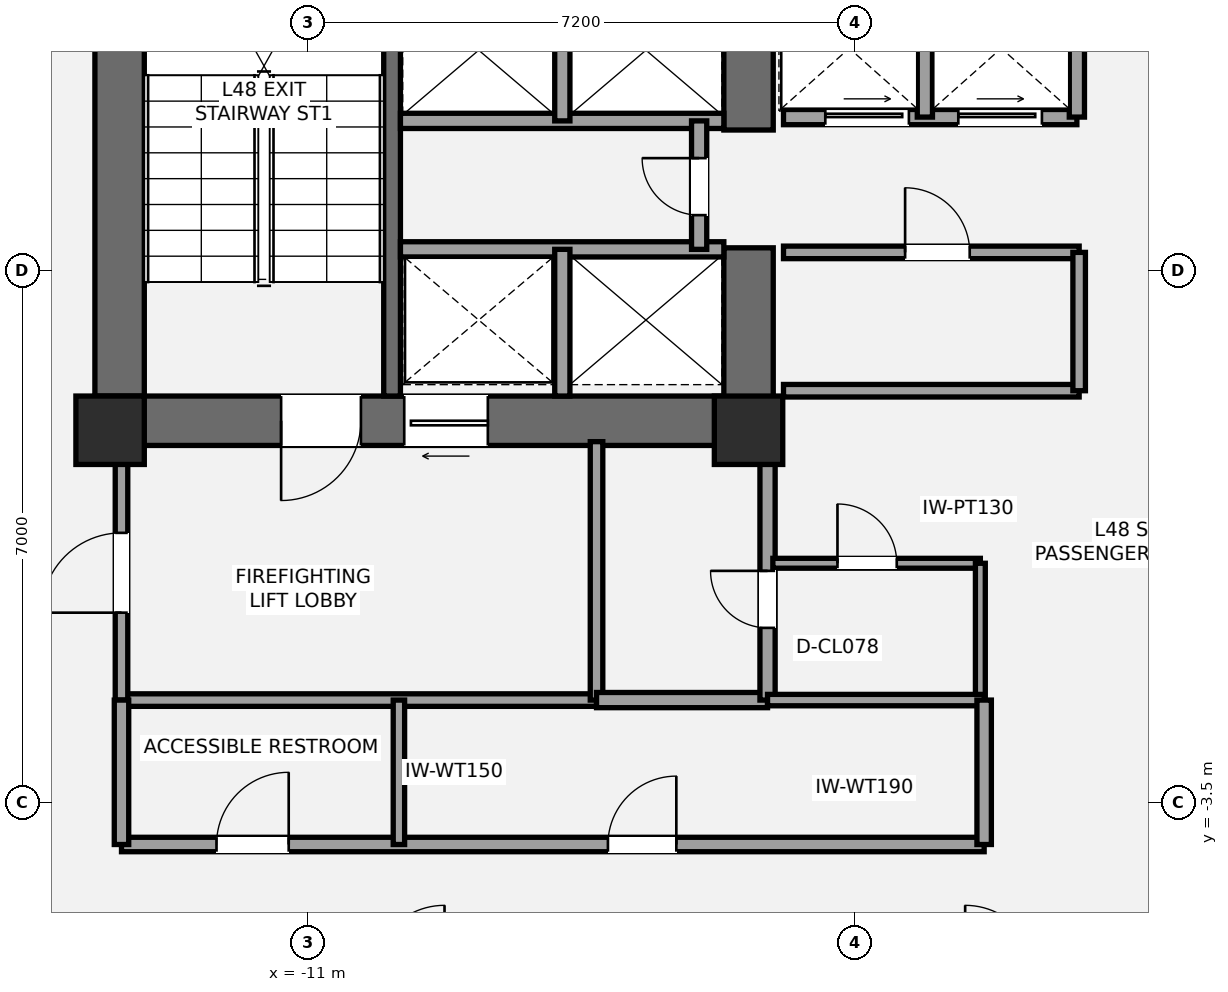
"""IFC4 building model, lengths in metres.
Left out: names, types, materials, properties, quantities, classifications, styles, units other than length and angle.
Written with IfcOpenShell. Run it as: python <this file> out.ifc"""

import sys

from ifc_helpers import new_model, si_unit, direction, frame, frame_2d, origin, origin_2d, place, context, subcontext, project, spatial, rectangle, extrude, element, fill, save


model = new_model("IFC4")
c1 = context("Model", 3, precision=1e-05, world=origin(), true_north=direction((0.0, 1.0)))
c2 = subcontext(c1, "Body", "Model", "MODEL_VIEW")
j1 = project(units=[si_unit("LENGTHUNIT", "METRE"), si_unit("PLANEANGLEUNIT", "RADIAN")], contexts=[c1])
p1 = place(None, origin())
s1 = spatial("IfcSite", under=j1, at=p1, CompositionType="ELEMENT")
p2 = place(p1, origin())
s2 = spatial("IfcBuilding", under=s1, at=p2, CompositionType="ELEMENT")
p3 = place(p2, frame((0.0, 0.0, 175.8)))
s3 = spatial("IfcBuildingStorey", under=s2, at=p3, CompositionType="ELEMENT", Elevation=175.8)
p4 = place(p3, frame((-13.475, 1.2, 0.0), z_axis=(0.0, 0.0, 1.0), x_axis=(0.0, 1.0, 0.0)))
e1 = element("IfcWall", 1, at=p4, inside=s3, PredefinedType="SHEAR", context=c2, shape_type="SweptSolid", body=[
    extrude(rectangle(XDim=8.45, YDim=0.65, at=frame_2d((4.225, 0.0))), origin(), (0.0, 0.0, 1.0), 3.2),
])
p5 = place(p3, frame((-4.875, 1.525, 0.0), z_axis=(0.0, 0.0, 1.0), x_axis=(-1.0, 0.0, 0.0)))
e2 = element("IfcWall", 2, at=p5, inside=s3, PredefinedType="SHEAR", context=c2, shape_type="SweptSolid", body=[
    extrude(rectangle(XDim=8.925, YDim=0.65, at=frame_2d((4.462, 0.0))), origin(), (0.0, 0.0, 1.0), 3.2),
])
p6 = place(p5, frame((5.425, 0.0, 0.0)))
e3 = element("IfcOpeningElement", 3, at=p6, cuts=e2, PredefinedType="OPENING", context=c2, shape_type="SweptSolid", body=[
    extrude(rectangle(XDim=1.05, YDim=2.15, at=frame_2d((0.525, 1.075))), frame((0.0, 0.335, 0.0), z_axis=(0.0, -1.0, 0.0), x_axis=(1.0, 0.0, 0.0)), (0.0, 0.0, 1.0), 0.67),
])
p7 = place(p5, frame((3.755, 0.0, 0.0)))
e4 = element("IfcOpeningElement", 4, at=p7, cuts=e2, PredefinedType="OPENING", context=c2, shape_type="SweptSolid", body=[
    extrude(rectangle(XDim=1.1, YDim=2.2, at=frame_2d((0.55, 1.1))), frame((0.0, 0.335, 0.0), z_axis=(0.0, -1.0, 0.0), x_axis=(1.0, 0.0, 0.0)), (0.0, 0.0, 1.0), 0.67),
])
p8 = place(p3, frame((-5.2, 1.2, 0.0), z_axis=(0.0, 0.0, 1.0), x_axis=(0.0, 1.0, 0.0)))
e5 = element("IfcWall", 5, at=p8, inside=s3, PredefinedType="SHEAR", context=c2, shape_type="SweptSolid", body=[
    extrude(rectangle(XDim=2.6, YDim=0.65, at=frame_2d((1.3, 0.0))), origin(), (0.0, 0.0, 1.0), 3.2),
])
p9 = place(p3, frame((-5.2, 5.35, 0.0), z_axis=(0.0, 0.0, 1.0), x_axis=(0.0, 1.0, 0.0)))
e6 = element("IfcWall", 6, at=p9, inside=s3, PredefinedType="SHEAR", context=c2, shape_type="SweptSolid", body=[
    extrude(rectangle(XDim=2.0, YDim=0.65, at=frame_2d((1.0, 0.0))), origin(), (0.0, 0.0, 1.0), 3.2),
])
p10 = place(p3, frame((-9.89, 1.85, 0.0), z_axis=(0.0, 0.0, 1.0), x_axis=(0.0, 1.0, 0.0)))
e7 = element("IfcWall", 7, at=p10, inside=s3, PredefinedType="SHEAR", context=c2, shape_type="SweptSolid", body=[
    extrude(rectangle(XDim=7.15, YDim=0.22, at=frame_2d((3.575, 0.0))), origin(), (0.0, 0.0, 1.0), 3.2),
])
for number, where, z_axis, x_axis in (
    (8, (-13.6, 1.4, 0.0), (0.0, 0.0, 1.0), (1.0, 0.0, 0.0)),
    (9, (-5.2, 1.4, 0.0), (0.0, 0.0, 1.0), (1.0, 0.0, 0.0)),
):
    element("IfcColumn", number, at=place(p3, frame(where, z_axis=z_axis, x_axis=x_axis)), inside=s3, PredefinedType="COLUMN", context=c2, shape_type="SweptSolid", body=[
        extrude(rectangle(XDim=0.9, YDim=0.9, at=origin_2d()), origin(), (0.0, 0.0, 1.0), 3.2),
    ])
p11 = place(p3, frame((-13.45, -2.15, 0.0), z_axis=(0.0, 0.0, 1.0), x_axis=(1.0, 0.0, 0.0)))
e10 = element("IfcWall", 10, at=p11, inside=s3, PredefinedType="PARTITIONING", context=c2, shape_type="SweptSolid", body=[
    extrude(rectangle(XDim=6.25, YDim=0.165, at=frame_2d((3.125, 0.0))), origin(), (0.0, 0.0, 1.0), 2.473),
])
p12 = place(p3, frame((-13.45, -2.15, 0.0), z_axis=(0.0, 0.0, 1.0), x_axis=(0.0, 1.0, 0.0)))
e11 = element("IfcWall", 11, at=p12, inside=s3, PredefinedType="PARTITIONING", context=c2, shape_type="SweptSolid", body=[
    extrude(rectangle(XDim=3.4, YDim=0.165, at=frame_2d((1.7, 0.0))), origin(), (0.0, 0.0, 1.0), 2.473),
])
p13 = place(p12, frame((1.15, 0.0, 0.0)))
e12 = element("IfcOpeningElement", 12, at=p13, cuts=e11, PredefinedType="OPENING", context=c2, shape_type="SweptSolid", body=[
    extrude(rectangle(XDim=1.05, YDim=2.15, at=frame_2d((0.525, 1.075))), frame((0.0, 0.093, 0.0), z_axis=(0.0, -1.0, 0.0), x_axis=(1.0, 0.0, 0.0)), (0.0, 0.0, 1.0), 0.185),
])
p14 = place(p3, frame((-7.2, -2.15, 0.0), z_axis=(0.0, 0.0, 1.0), x_axis=(0.0, 1.0, 0.0)))
e13 = element("IfcWall", 13, at=p14, inside=s3, PredefinedType="PARTITIONING", context=c2, shape_type="SweptSolid", body=[
    extrude(rectangle(XDim=3.4, YDim=0.165, at=frame_2d((1.7, 0.0))), origin(), (0.0, 0.0, 1.0), 2.473),
])
p15 = place(p3, frame((-7.2, -2.15, 0.0), z_axis=(0.0, 0.0, 1.0), x_axis=(1.0, 0.0, 0.0)))
e14 = element("IfcWall", 14, at=p15, inside=s3, PredefinedType="SOLIDWALL", context=c2, shape_type="SweptSolid", body=[
    extrude(rectangle(XDim=2.25, YDim=0.2, at=frame_2d((1.125, 0.0))), origin(), (0.0, 0.0, 1.0), 3.02),
])
p16 = place(p3, frame((-4.95, -2.15, 0.0), z_axis=(0.0, 0.0, 1.0), x_axis=(0.0, 1.0, 0.0)))
e15 = element("IfcWall", 15, at=p16, inside=s3, PredefinedType="SOLIDWALL", context=c2, shape_type="SweptSolid", body=[
    extrude(rectangle(XDim=3.4, YDim=0.2, at=frame_2d((1.7, 0.0))), origin(), (0.0, 0.0, 1.0), 2.473),
])
p17 = place(p16, frame((0.95, 0.0, 0.0)))
e16 = element("IfcOpeningElement", 16, at=p17, cuts=e15, PredefinedType="OPENING", context=c2, shape_type="SweptSolid", body=[
    extrude(rectangle(XDim=0.75, YDim=2.1, at=frame_2d((0.375, 1.05))), frame((0.0, 0.11, 0.0), z_axis=(0.0, -1.0, 0.0), x_axis=(1.0, 0.0, 0.0)), (0.0, 0.0, 1.0), 0.22),
])
p18 = place(p3, frame((-4.88, -0.35, 0.0), z_axis=(0.0, 0.0, 1.0), x_axis=(1.0, 0.0, 0.0)))
e17 = element("IfcWall", 17, at=p18, inside=s3, PredefinedType="PARTITIONING", context=c2, shape_type="SweptSolid", body=[
    extrude(rectangle(XDim=2.73, YDim=0.13, at=frame_2d((1.365, 0.0))), origin(), (0.0, 0.0, 1.0), 3.02),
])
p19 = place(p18, frame((0.85, 0.0, 0.0)))
e18 = element("IfcOpeningElement", 18, at=p19, cuts=e17, PredefinedType="OPENING", context=c2, shape_type="SweptSolid", body=[
    extrude(rectangle(XDim=0.78, YDim=2.1, at=frame_2d((0.39, 1.05))), frame((0.0, 0.075, 0.0), z_axis=(0.0, -1.0, 0.0), x_axis=(1.0, 0.0, 0.0)), (0.0, 0.0, 1.0), 0.15),
])
p20 = place(p3, frame((-2.15, -2.15, 0.0), z_axis=(0.0, 0.0, 1.0), x_axis=(0.0, 1.0, 0.0)))
e19 = element("IfcWall", 19, at=p20, inside=s3, PredefinedType="PARTITIONING", context=c2, shape_type="SweptSolid", body=[
    extrude(rectangle(XDim=1.8, YDim=0.13, at=frame_2d((0.9, 0.0))), origin(), (0.0, 0.0, 1.0), 3.02),
])
p21 = place(p3, frame((-9.78, 3.78, 0.0), z_axis=(0.0, 0.0, 1.0), x_axis=(1.0, 0.0, 0.0)))
e20 = element("IfcWall", 20, at=p21, inside=s3, PredefinedType="SOLIDWALL", context=c2, shape_type="SweptSolid", body=[
    extrude(rectangle(XDim=4.255, YDim=0.2, at=frame_2d((2.127, 0.0))), origin(), (0.0, 0.0, 1.0), 3.02),
])
p22 = place(p3, frame((-7.65, 1.85, 0.0), z_axis=(0.0, 0.0, 1.0), x_axis=(0.0, 1.0, 0.0)))
e21 = element("IfcWall", 21, at=p22, inside=s3, PredefinedType="SOLIDWALL", context=c2, shape_type="SweptSolid", body=[
    extrude(rectangle(XDim=1.93, YDim=0.2, at=frame_2d((0.965, 0.0))), origin(), (0.0, 0.0, 1.0), 3.02),
])
p23 = place(p3, frame((-9.78, 5.47, 0.0), z_axis=(0.0, 0.0, 1.0), x_axis=(1.0, 0.0, 0.0)))
e22 = element("IfcWall", 22, at=p23, inside=s3, PredefinedType="SOLIDWALL", context=c2, shape_type="SweptSolid", body=[
    extrude(rectangle(XDim=4.255, YDim=0.2, at=frame_2d((2.127, 0.0))), origin(), (0.0, 0.0, 1.0), 3.02),
])
p24 = place(p3, frame((-7.65, 5.47, 0.0), z_axis=(0.0, 0.0, 1.0), x_axis=(0.0, 1.0, 0.0)))
e23 = element("IfcWall", 23, at=p24, inside=s3, PredefinedType="SOLIDWALL", context=c2, shape_type="SweptSolid", body=[
    extrude(rectangle(XDim=1.86, YDim=0.2, at=frame_2d((0.93, 0.0))), origin(), (0.0, 0.0, 1.0), 3.02),
])
p25 = place(p3, frame((-5.85, 3.78, 0.0), z_axis=(0.0, 0.0, 1.0), x_axis=(0.0, 1.0, 0.0)))
e24 = element("IfcWall", 24, at=p25, inside=s3, PredefinedType="SOLIDWALL", context=c2, shape_type="SweptSolid", body=[
    extrude(rectangle(XDim=1.69, YDim=0.2, at=frame_2d((0.845, 0.0))), origin(), (0.0, 0.0, 1.0), 3.02),
])
p26 = place(p25, frame((0.45, 0.0, 0.0)))
e25 = element("IfcOpeningElement", 25, at=p26, cuts=e24, PredefinedType="OPENING", context=c2, shape_type="SweptSolid", body=[
    extrude(rectangle(XDim=0.75, YDim=2.1, at=frame_2d((0.375, 1.05))), frame((0.0, 0.11, 0.0), z_axis=(0.0, -1.0, 0.0), x_axis=(1.0, 0.0, 0.0)), (0.0, 0.0, 1.0), 0.22),
])
p27 = place(p3, frame((-4.74, 1.92, 0.0), z_axis=(0.0, 0.0, 1.0), x_axis=(1.0, 0.0, 0.0)))
e26 = element("IfcWall", 26, at=p27, inside=s3, PredefinedType="PARTITIONING", context=c2, shape_type="SweptSolid", body=[
    extrude(rectangle(XDim=3.89, YDim=0.165, at=frame_2d((1.945, 0.0))), origin(), (0.0, 0.0, 1.0), 2.16),
])
p28 = place(p3, frame((-4.74, 3.74, 0.0), z_axis=(0.0, 0.0, 1.0), x_axis=(1.0, 0.0, 0.0)))
e27 = element("IfcWall", 27, at=p28, inside=s3, PredefinedType="PARTITIONING", context=c2, shape_type="SweptSolid", body=[
    extrude(rectangle(XDim=3.89, YDim=0.165, at=frame_2d((1.945, 0.0))), origin(), (0.0, 0.0, 1.0), 3.02),
])
p29 = place(p28, frame((1.6, 0.0, 0.0)))
e28 = element("IfcOpeningElement", 28, at=p29, cuts=e27, PredefinedType="OPENING", context=c2, shape_type="SweptSolid", body=[
    extrude(rectangle(XDim=0.85, YDim=2.1, at=frame_2d((0.425, 1.05))), frame((0.0, 0.093, 0.0), z_axis=(0.0, -1.0, 0.0), x_axis=(1.0, 0.0, 0.0)), (0.0, 0.0, 1.0), 0.185),
])
p30 = place(p3, frame((-0.85, 1.92, 0.0), z_axis=(0.0, 0.0, 1.0), x_axis=(0.0, 1.0, 0.0)))
e29 = element("IfcWall", 29, at=p30, inside=s3, PredefinedType="PARTITIONING", context=c2, shape_type="SweptSolid", body=[
    extrude(rectangle(XDim=1.82, YDim=0.165, at=frame_2d((0.91, 0.0))), origin(), (0.0, 0.0, 1.0), 3.02),
])
p31 = place(p3, frame((-4.74, 5.52, 0.0), z_axis=(0.0, 0.0, 1.0), x_axis=(1.0, 0.0, 0.0)))
e30 = element("IfcWall", 30, at=p31, inside=s3, PredefinedType="SOLIDWALL", context=c2, shape_type="SweptSolid", body=[
    extrude(rectangle(XDim=3.86, YDim=0.2, at=frame_2d((1.93, 0.0))), origin(), (0.0, 0.0, 1.0), 3.02),
])
p32 = place(p31, frame((0.55, 0.0, 0.0)))
e31 = element("IfcOpeningElement", 31, at=p32, cuts=e30, PredefinedType="OPENING", context=c2, shape_type="SweptSolid", body=[
    extrude(rectangle(XDim=1.1, YDim=2.2, at=frame_2d((0.55, 1.1))), frame((0.0, 0.11, 0.0), z_axis=(0.0, -1.0, 0.0), x_axis=(1.0, 0.0, 0.0)), (0.0, 0.0, 1.0), 0.22),
])
p33 = place(p31, frame((2.3, 0.0, 0.0)))
e32 = element("IfcOpeningElement", 32, at=p33, cuts=e30, PredefinedType="OPENING", context=c2, shape_type="SweptSolid", body=[
    extrude(rectangle(XDim=1.1, YDim=2.2, at=frame_2d((0.55, 1.1))), frame((0.0, 0.11, 0.0), z_axis=(0.0, -1.0, 0.0), x_axis=(1.0, 0.0, 0.0)), (0.0, 0.0, 1.0), 0.22),
])
for number, where, z_axis, x_axis in (
    (33, (-2.88, 5.52, 0.0), (0.0, 0.0, 1.0), (0.0, 1.0, 0.0)),
    (34, (-0.88, 5.52, 0.0), (0.0, 0.0, 1.0), (0.0, 1.0, 0.0)),
):
    element("IfcWall", number, at=place(p3, frame(where, z_axis=z_axis, x_axis=x_axis)), inside=s3, PredefinedType="SOLIDWALL", context=c2, shape_type="SweptSolid", body=[
        extrude(rectangle(XDim=1.81, YDim=0.2, at=frame_2d((0.905, 0.0))), origin(), (0.0, 0.0, 1.0), 3.02),
    ])
p34 = place(p3, frame((-13.45, -4.05, 0.0), z_axis=(0.0, 0.0, 1.0), x_axis=(1.0, 0.0, 0.0)))
e35 = element("IfcWall", 35, at=p34, inside=s3, PredefinedType="PLUMBINGWALL", context=c2, shape_type="SweptSolid", body=[
    extrude(rectangle(XDim=11.35, YDim=0.19, at=frame_2d((5.675, 0.0))), origin(), (0.0, 0.0, 1.0), 2.473),
])
p35 = place(p34, frame((1.25, 0.0, 0.0)))
e36 = element("IfcOpeningElement", 36, at=p35, cuts=e35, PredefinedType="OPENING", context=c2, shape_type="SweptSolid", body=[
    extrude(rectangle(XDim=0.95, YDim=2.15, at=frame_2d((0.475, 1.075))), frame((0.0, 0.105, 0.0), z_axis=(0.0, -1.0, 0.0), x_axis=(1.0, 0.0, 0.0)), (0.0, 0.0, 1.0), 0.21),
])
p36 = place(p34, frame((6.4, 0.0, 0.0)))
e37 = element("IfcOpeningElement", 37, at=p36, cuts=e35, PredefinedType="OPENING", context=c2, shape_type="SweptSolid", body=[
    extrude(rectangle(XDim=0.9, YDim=2.1, at=frame_2d((0.45, 1.05))), frame((0.0, 0.105, 0.0), z_axis=(0.0, -1.0, 0.0), x_axis=(1.0, 0.0, 0.0)), (0.0, 0.0, 1.0), 0.21),
])
p37 = place(p3, frame((-4.95, -2.15, 0.0), z_axis=(0.0, 0.0, 1.0), x_axis=(1.0, 0.0, 0.0)))
e38 = element("IfcWall", 38, at=p37, inside=s3, PredefinedType="PLUMBINGWALL", context=c2, shape_type="SweptSolid", body=[
    extrude(rectangle(XDim=2.85, YDim=0.15, at=frame_2d((1.425, 0.0))), origin(), (0.0, 0.0, 1.0), 3.02),
])
p38 = place(p3, frame((-13.45, -4.05, 0.0), z_axis=(0.0, 0.0, 1.0), x_axis=(0.0, 1.0, 0.0)))
e39 = element("IfcWall", 39, at=p38, inside=s3, PredefinedType="PLUMBINGWALL", context=c2, shape_type="SweptSolid", body=[
    extrude(rectangle(XDim=1.9, YDim=0.19, at=frame_2d((0.95, 0.0))), origin(), (0.0, 0.0, 1.0), 2.473),
])
p39 = place(p3, frame((-2.1, -4.05, 0.0), z_axis=(0.0, 0.0, 1.0), x_axis=(0.0, 1.0, 0.0)))
e40 = element("IfcWall", 40, at=p39, inside=s3, PredefinedType="PLUMBINGWALL", context=c2, shape_type="SweptSolid", body=[
    extrude(rectangle(XDim=1.9, YDim=0.19, at=frame_2d((0.95, 0.0))), origin(), (0.0, 0.0, 1.0), 3.02),
])
p40 = place(p3, frame((-9.8, -4.05, 0.0), z_axis=(0.0, 0.0, 1.0), x_axis=(0.0, 1.0, 0.0)))
e41 = element("IfcWall", 41, at=p40, inside=s3, PredefinedType="PLUMBINGWALL", context=c2, shape_type="SweptSolid", body=[
    extrude(rectangle(XDim=1.9, YDim=0.15, at=frame_2d((0.95, 0.0))), origin(), (0.0, 0.0, 1.0), 2.473),
])
p41 = place(p6, origin())
e42 = element("IfcDoor", 42, at=p41, inside=s3, OperationType="SINGLE_SWING_RIGHT", PredefinedType="DOOR", context=c2, shape_type="SweptSolid", body=[
    extrude(rectangle(XDim=1.05, YDim=2.15, at=frame_2d((0.525, 1.075))), frame((0.0, 0.025, 0.0), z_axis=(0.0, -1.0, 0.0), x_axis=(1.0, 0.0, 0.0)), (0.0, 0.0, 1.0), 0.05),
])
fill(e3, e42)
p42 = place(p13, origin())
e43 = element("IfcDoor", 43, at=p42, inside=s3, OperationType="SINGLE_SWING_LEFT", PredefinedType="DOOR", context=c2, shape_type="SweptSolid", body=[
    extrude(rectangle(XDim=1.05, YDim=2.15, at=frame_2d((0.525, 1.075))), frame((0.0, 0.025, 0.0), z_axis=(0.0, -1.0, 0.0), x_axis=(1.0, 0.0, 0.0)), (0.0, 0.0, 1.0), 0.05),
])
fill(e12, e43)
p43 = place(p17, origin())
e44 = element("IfcDoor", 44, at=p43, inside=s3, OperationType="SINGLE_SWING_RIGHT", PredefinedType="DOOR", context=c2, shape_type="SweptSolid", body=[
    extrude(rectangle(XDim=0.75, YDim=2.1, at=frame_2d((0.375, 1.05))), frame((0.0, 0.025, 0.0), z_axis=(0.0, -1.0, 0.0), x_axis=(1.0, 0.0, 0.0)), (0.0, 0.0, 1.0), 0.05),
])
fill(e16, e44)
p44 = place(p19, origin())
e45 = element("IfcDoor", 45, at=p44, inside=s3, OperationType="SINGLE_SWING_LEFT", PredefinedType="DOOR", context=c2, shape_type="SweptSolid", body=[
    extrude(rectangle(XDim=0.78, YDim=2.1, at=frame_2d((0.39, 1.05))), frame((0.0, 0.025, 0.0), z_axis=(0.0, -1.0, 0.0), x_axis=(1.0, 0.0, 0.0)), (0.0, 0.0, 1.0), 0.05),
])
fill(e18, e45)
p45 = place(p7, origin())
e46 = element("IfcDoor", 46, at=p45, inside=s3, OperationType="SLIDING_TO_LEFT", PredefinedType="DOOR", context=c2, shape_type="SweptSolid", body=[
    extrude(rectangle(XDim=1.1, YDim=2.2, at=frame_2d((0.55, 1.1))), frame((0.0, 0.025, 0.0), z_axis=(0.0, -1.0, 0.0), x_axis=(1.0, 0.0, 0.0)), (0.0, 0.0, 1.0), 0.05),
])
fill(e4, e46)
p46 = place(p26, origin())
e47 = element("IfcDoor", 47, at=p46, inside=s3, OperationType="SINGLE_SWING_RIGHT", PredefinedType="DOOR", context=c2, shape_type="SweptSolid", body=[
    extrude(rectangle(XDim=0.75, YDim=2.1, at=frame_2d((0.375, 1.05))), frame((0.0, 0.025, 0.0), z_axis=(0.0, -1.0, 0.0), x_axis=(1.0, 0.0, 0.0)), (0.0, 0.0, 1.0), 0.05),
])
fill(e25, e47)
p47 = place(p29, origin())
e48 = element("IfcDoor", 48, at=p47, inside=s3, OperationType="SINGLE_SWING_LEFT", PredefinedType="DOOR", context=c2, shape_type="SweptSolid", body=[
    extrude(rectangle(XDim=0.85, YDim=2.1, at=frame_2d((0.425, 1.05))), frame((0.0, 0.025, 0.0), z_axis=(0.0, -1.0, 0.0), x_axis=(1.0, 0.0, 0.0)), (0.0, 0.0, 1.0), 0.05),
])
fill(e28, e48)
p48 = place(p32, origin())
e49 = element("IfcDoor", 49, at=p48, inside=s3, OperationType="SLIDING_TO_LEFT", PredefinedType="DOOR", context=c2, shape_type="SweptSolid", body=[
    extrude(rectangle(XDim=1.1, YDim=2.2, at=frame_2d((0.55, 1.1))), frame((0.0, 0.025, 0.0), z_axis=(0.0, -1.0, 0.0), x_axis=(1.0, 0.0, 0.0)), (0.0, 0.0, 1.0), 0.05),
])
fill(e31, e49)
p49 = place(p33, origin())
e50 = element("IfcDoor", 50, at=p49, inside=s3, OperationType="SLIDING_TO_LEFT", PredefinedType="DOOR", context=c2, shape_type="SweptSolid", body=[
    extrude(rectangle(XDim=1.1, YDim=2.2, at=frame_2d((0.55, 1.1))), frame((0.0, 0.025, 0.0), z_axis=(0.0, -1.0, 0.0), x_axis=(1.0, 0.0, 0.0)), (0.0, 0.0, 1.0), 0.05),
])
fill(e32, e50)
p50 = place(p35, origin())
e51 = element("IfcDoor", 51, at=p50, inside=s3, OperationType="SINGLE_SWING_RIGHT", PredefinedType="DOOR", context=c2, shape_type="SweptSolid", body=[
    extrude(rectangle(XDim=0.95, YDim=2.15, at=frame_2d((0.475, 1.075))), frame((0.0, 0.025, 0.0), z_axis=(0.0, -1.0, 0.0), x_axis=(1.0, 0.0, 0.0)), (0.0, 0.0, 1.0), 0.05),
])
fill(e36, e51)
p51 = place(p36, origin())
e52 = element("IfcDoor", 52, at=p51, inside=s3, OperationType="SINGLE_SWING_RIGHT", PredefinedType="DOOR", context=c2, shape_type="SweptSolid", body=[
    extrude(rectangle(XDim=0.9, YDim=2.1, at=frame_2d((0.45, 1.05))), frame((0.0, 0.025, 0.0), z_axis=(0.0, -1.0, 0.0), x_axis=(1.0, 0.0, 0.0)), (0.0, 0.0, 1.0), 0.05),
])
fill(e37, e52)
save(model, sys.argv[1])
